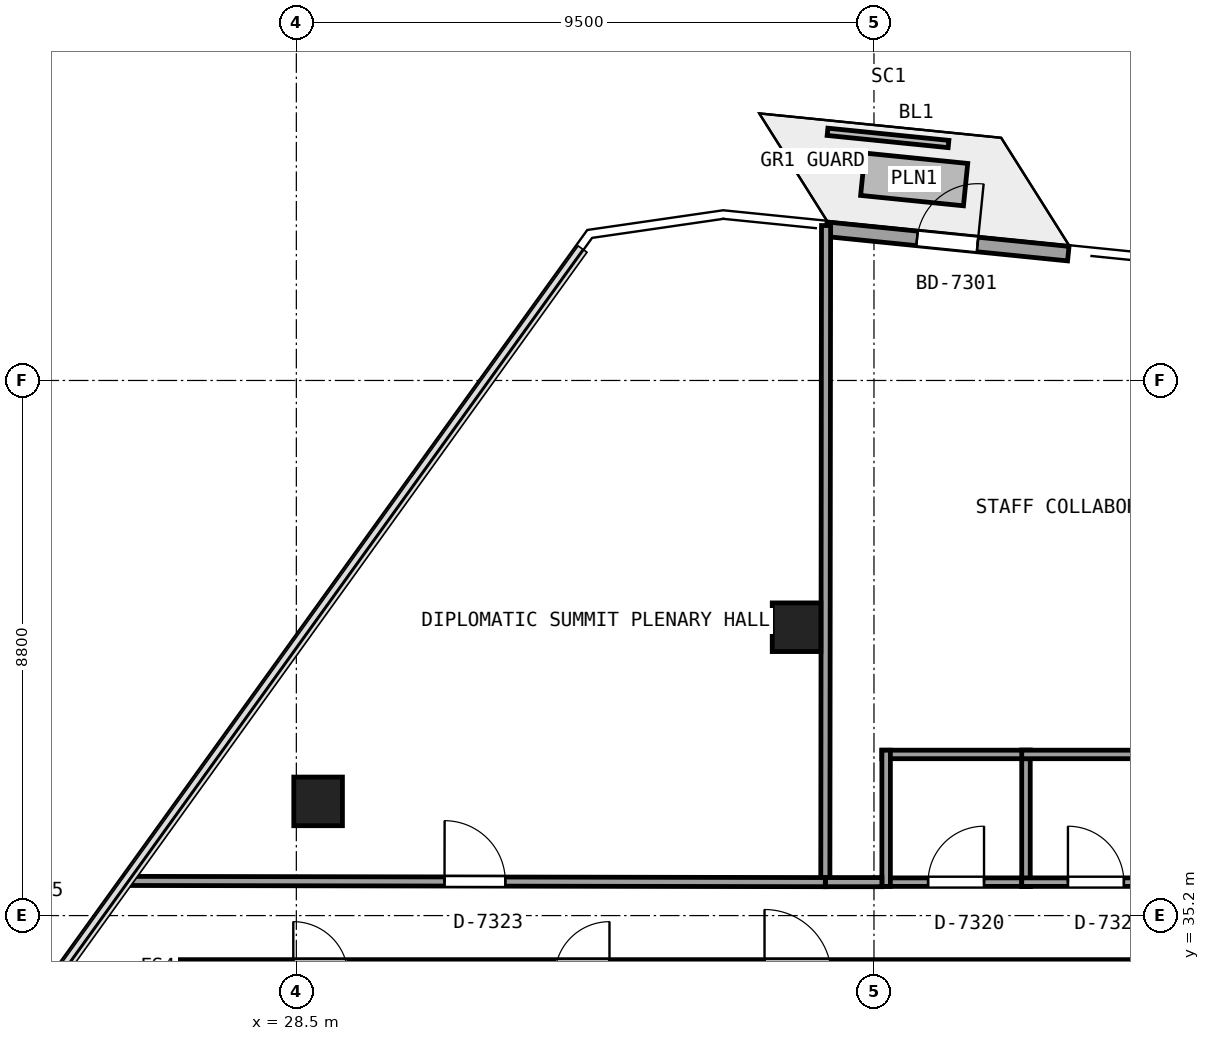
"""IFC4 building model, lengths in metres.
Left out: names, types, materials, properties, quantities, classifications, styles, units other than length and angle.
Written with IfcOpenShell. Run it as: python <this file> out.ifc"""

import sys

from ifc_helpers import new_model, si_unit, direction, frame, frame_2d, origin, origin_2d, place, context, subcontext, project, spatial, rectangle, extrude, element, fill, save


model = new_model("IFC4")
c1 = context("Model", 3, precision=1e-05, world=origin(), true_north=direction((0.0, 1.0)))
c2 = subcontext(c1, "Body", "Model", "MODEL_VIEW")
j1 = project(units=[si_unit("LENGTHUNIT", "METRE"), si_unit("PLANEANGLEUNIT", "RADIAN")], contexts=[c1])
p1 = place(None, origin())
s1 = spatial("IfcSite", under=j1, at=p1, CompositionType="ELEMENT")
p2 = place(p1, origin())
s2 = spatial("IfcBuilding", under=s1, at=p2, CompositionType="ELEMENT")
p3 = place(p2, frame((0.0, 0.0, 271.5)))
s3 = spatial("IfcBuildingStorey", under=s2, at=p3, CompositionType="ELEMENT", Elevation=271.5)
p4 = place(p3, frame((26.525, 34.2, 0.0), z_axis=(0.0, 0.0, 1.0), x_axis=(1.0, 0.0, 0.0)))
e1 = element("IfcWall", 1, at=p4, inside=s3, PredefinedType="SHEAR", context=c2, shape_type="SweptSolid", body=[
    extrude(rectangle(XDim=21.35, YDim=0.55, at=frame_2d((10.675, 0.0))), origin(), (0.0, 0.0, 1.0), 3.32),
])
p5 = place(p4, frame((9.675, 0.0, 0.0)))
e2 = element("IfcOpeningElement", 2, at=p5, cuts=e1, PredefinedType="OPENING", context=c2, shape_type="SweptSolid", body=[
    extrude(rectangle(XDim=1.1, YDim=2.15, at=frame_2d((0.55, 1.075))), frame((0.0, 0.285, 0.0), z_axis=(0.0, -1.0, 0.0), x_axis=(1.0, 0.0, 0.0)), (0.0, 0.0, 1.0), 0.57),
])
p6 = place(p4, frame((1.925, 0.0, 0.0)))
e3 = element("IfcOpeningElement", 3, at=p6, cuts=e1, PredefinedType="OPENING", context=c2, shape_type="SweptSolid", body=[
    extrude(rectangle(XDim=0.9, YDim=2.1, at=frame_2d((0.45, 1.05))), frame((0.0, 0.285, 0.0), z_axis=(0.0, -1.0, 0.0), x_axis=(1.0, 0.0, 0.0)), (0.0, 0.0, 1.0), 0.57),
])
p7 = place(p4, frame((6.225, 0.0, 0.0)))
e4 = element("IfcOpeningElement", 4, at=p7, cuts=e1, PredefinedType="OPENING", context=c2, shape_type="SweptSolid", body=[
    extrude(rectangle(XDim=0.9, YDim=2.1, at=frame_2d((0.45, 1.05))), frame((0.0, 0.285, 0.0), z_axis=(0.0, -1.0, 0.0), x_axis=(1.0, 0.0, 0.0)), (0.0, 0.0, 1.0), 0.57),
])
for number, where, z_axis, x_axis in (
    (5, (36.727, 39.942, 0.0), (0.0, 0.0, 1.0), (1.0, 0.0, 0.0)),
    (6, (28.858, 37.078, 0.0), (0.0, 0.0, 1.0), (1.0, 0.0, 0.0)),
):
    element("IfcColumn", number, at=place(p3, frame(where, z_axis=z_axis, x_axis=x_axis)), inside=s3, PredefinedType="COLUMN", context=c2, shape_type="SweptSolid", body=[
        extrude(rectangle(XDim=0.8, YDim=0.8, at=origin_2d()), origin(), (0.0, 0.0, 1.0), 3.32),
    ])
p8 = place(p3, frame((37.216, 46.487, 0.0), z_axis=(0.0, 0.0, 1.0), x_axis=(0.994959540857, -0.100277176152, 0.0)))
e7 = element("IfcWall", 7, at=p8, inside=s3, PredefinedType="SOLIDWALL", context=c2, shape_type="SweptSolid", body=[
    extrude(rectangle(XDim=4.0, YDim=0.24, at=frame_2d((2.0, 0.0))), origin(), (0.0, 0.0, 1.0), 3.32),
])
p9 = place(p8, frame((1.5, 0.0, 0.0)))
e8 = element("IfcOpeningElement", 8, at=p9, cuts=e7, PredefinedType="OPENING", context=c2, shape_type="SweptSolid", body=[
    extrude(rectangle(XDim=1.0, YDim=2.15, at=frame_2d((0.5, 1.075))), frame((0.0, 0.13, 0.0), z_axis=(0.0, -1.0, 0.0), x_axis=(1.0, 0.0, 0.0)), (0.0, 0.0, 1.0), 0.26),
])
p10 = place(p3, frame((38.13, 35.75, 0.0), z_axis=(0.0, 0.0, 1.0), x_axis=(1.0, 0.0, 0.0)))
e9 = element("IfcWall", 9, at=p10, inside=s3, PredefinedType="PARTITIONING", context=c2, shape_type="SweptSolid", body=[
    extrude(rectangle(XDim=2.44, YDim=0.14, at=frame_2d((1.22, 0.0))), origin(), (0.0, 0.0, 1.0), 2.841),
])
p11 = place(p10, frame((0.76, 0.0, 0.0)))
e10 = element("IfcOpeningElement", 10, at=p11, cuts=e9, PredefinedType="OPENING", context=c2, shape_type="SweptSolid", body=[
    extrude(rectangle(XDim=0.92, YDim=2.1, at=frame_2d((0.46, 1.05))), frame((0.0, 0.08, 0.0), z_axis=(0.0, -1.0, 0.0), x_axis=(1.0, 0.0, 0.0)), (0.0, 0.0, 1.0), 0.16),
])
p12 = place(p3, frame((40.5, 35.68, 0.0), z_axis=(0.0, 0.0, 1.0), x_axis=(0.0, 1.0, 0.0)))
e11 = element("IfcWall", 11, at=p12, inside=s3, PredefinedType="PARTITIONING", context=c2, shape_type="SweptSolid", body=[
    extrude(rectangle(XDim=2.24, YDim=0.14, at=frame_2d((1.12, 0.0))), origin(), (0.0, 0.0, 1.0), 2.993),
])
p13 = place(p3, frame((40.57, 37.85, 0.0), z_axis=(0.0, 0.0, 1.0), x_axis=(-1.0, 0.0, 0.0)))
e12 = element("IfcWall", 12, at=p13, inside=s3, PredefinedType="PARTITIONING", context=c2, shape_type="SweptSolid", body=[
    extrude(rectangle(XDim=2.44, YDim=0.14, at=frame_2d((1.22, 0.0))), origin(), (0.0, 0.0, 1.0), 2.841),
])
p14 = place(p3, frame((38.2, 37.92, 0.0), z_axis=(0.0, 0.0, 1.0), x_axis=(0.0, -1.0, 0.0)))
e13 = element("IfcWall", 13, at=p14, inside=s3, PredefinedType="PARTITIONING", context=c2, shape_type="SweptSolid", body=[
    extrude(rectangle(XDim=2.24, YDim=0.14, at=frame_2d((1.12, 0.0))), origin(), (0.0, 0.0, 1.0), 2.993),
])
p15 = place(p3, frame((40.43, 35.75, 0.0), z_axis=(0.0, 0.0, 1.0), x_axis=(1.0, 0.0, 0.0)))
e14 = element("IfcWall", 14, at=p15, inside=s3, PredefinedType="PARTITIONING", context=c2, shape_type="SweptSolid", body=[
    extrude(rectangle(XDim=2.44, YDim=0.14, at=frame_2d((1.22, 0.0))), origin(), (0.0, 0.0, 1.0), 2.841),
])
p16 = place(p15, frame((0.76, 0.0, 0.0)))
e15 = element("IfcOpeningElement", 15, at=p16, cuts=e14, PredefinedType="OPENING", context=c2, shape_type="SweptSolid", body=[
    extrude(rectangle(XDim=0.92, YDim=2.1, at=frame_2d((0.46, 1.05))), frame((0.0, 0.08, 0.0), z_axis=(0.0, -1.0, 0.0), x_axis=(1.0, 0.0, 0.0)), (0.0, 0.0, 1.0), 0.16),
])
p17 = place(p3, frame((42.87, 37.85, 0.0), z_axis=(0.0, 0.0, 1.0), x_axis=(-1.0, 0.0, 0.0)))
e16 = element("IfcWall", 16, at=p17, inside=s3, PredefinedType="PARTITIONING", context=c2, shape_type="SweptSolid", body=[
    extrude(rectangle(XDim=2.44, YDim=0.14, at=frame_2d((1.22, 0.0))), origin(), (0.0, 0.0, 1.0), 2.841),
])
p18 = place(p3, frame((37.212, 46.548, 0.0), z_axis=(0.0, 0.0, 1.0), x_axis=(-0.001107869722, -0.999999386312, 0.0)))
e17 = element("IfcWall", 17, at=p18, inside=s3, PredefinedType="PARTITIONING", context=c2, shape_type="SweptSolid", body=[
    extrude(rectangle(XDim=10.798, YDim=0.15, at=frame_2d((5.399, 0.0))), origin(), (0.0, 0.0, 1.0), 2.845),
])
p19 = place(p3, frame((37.2, 35.75, 0.0), z_axis=(0.0, 0.0, 1.0), x_axis=(1.0, 0.0, 0.0)))
e18 = element("IfcWall", 18, at=p19, inside=s3, PredefinedType="PARTITIONING", context=c2, shape_type="SweptSolid", body=[
    extrude(rectangle(XDim=0.93, YDim=0.15, at=frame_2d((0.465, 0.0))), origin(), (0.0, 0.0, 1.0), 3.32),
])
p20 = place(p3, frame((25.674, 35.77, 0.0), z_axis=(0.0, 0.0, 1.0), x_axis=(0.999998491558, -0.001736917524, 0.0)))
e19 = element("IfcWall", 19, at=p20, inside=s3, PredefinedType="PARTITIONING", context=c2, shape_type="SweptSolid", body=[
    extrude(rectangle(XDim=11.526, YDim=0.15, at=frame_2d((5.763, 0.0))), origin(), (0.0, 0.0, 1.0), 2.769),
])
p21 = place(p20, frame((5.263, 0.0, 0.0)))
e20 = element("IfcOpeningElement", 20, at=p21, cuts=e19, PredefinedType="OPENING", context=c2, shape_type="SweptSolid", body=[
    extrude(rectangle(XDim=1.0, YDim=2.15, at=frame_2d((0.5, 1.075))), frame((0.0, 0.085, 0.0), z_axis=(0.0, -1.0, 0.0), x_axis=(1.0, 0.0, 0.0)), (0.0, 0.0, 1.0), 0.17),
])
p22 = place(p9, origin())
e21 = element("IfcDoor", 21, at=p22, inside=s3, OperationType="SINGLE_SWING_RIGHT", PredefinedType="DOOR", context=c2, shape_type="SweptSolid", body=[
    extrude(rectangle(XDim=1.0, YDim=2.15, at=frame_2d((0.5, 1.075))), frame((0.0, 0.025, 0.0), z_axis=(0.0, -1.0, 0.0), x_axis=(1.0, 0.0, 0.0)), (0.0, 0.0, 1.0), 0.05),
])
fill(e8, e21)
p23 = place(p11, origin())
e22 = element("IfcDoor", 22, at=p23, inside=s3, OperationType="SINGLE_SWING_RIGHT", PredefinedType="DOOR", context=c2, shape_type="SweptSolid", body=[
    extrude(rectangle(XDim=0.92, YDim=2.1, at=frame_2d((0.46, 1.05))), frame((0.0, 0.025, 0.0), z_axis=(0.0, -1.0, 0.0), x_axis=(1.0, 0.0, 0.0)), (0.0, 0.0, 1.0), 0.05),
])
fill(e10, e22)
p24 = place(p16, origin())
e23 = element("IfcDoor", 23, at=p24, inside=s3, OperationType="SINGLE_SWING_LEFT", PredefinedType="DOOR", context=c2, shape_type="SweptSolid", body=[
    extrude(rectangle(XDim=0.92, YDim=2.1, at=frame_2d((0.46, 1.05))), frame((0.0, 0.025, 0.0), z_axis=(0.0, -1.0, 0.0), x_axis=(1.0, 0.0, 0.0)), (0.0, 0.0, 1.0), 0.05),
])
fill(e15, e23)
p25 = place(p21, origin())
e24 = element("IfcDoor", 24, at=p25, inside=s3, OperationType="SINGLE_SWING_LEFT", PredefinedType="DOOR", context=c2, shape_type="SweptSolid", body=[
    extrude(rectangle(XDim=1.0, YDim=2.15, at=frame_2d((0.5, 1.075))), frame((0.0, 0.025, 0.0), z_axis=(0.0, -1.0, 0.0), x_axis=(1.0, 0.0, 0.0)), (0.0, 0.0, 1.0), 0.05),
])
fill(e20, e24)
save(model, sys.argv[1])
